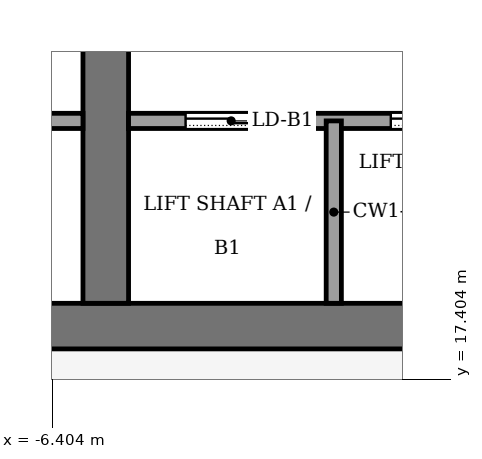
"""IFC4 building model, lengths in metres.
Left out: names, types, materials, properties, quantities, classifications, styles, units other than length and angle.
Written with IfcOpenShell. Run it as: python <this file> out.ifc"""

import sys

from ifc_helpers import new_model, si_unit, direction, frame, frame_2d, origin, place, context, subcontext, project, spatial, rectangle, extrude, element, fill, save


model = new_model("IFC4")
c1 = context("Model", 3, precision=1e-05, world=origin(), true_north=direction((0.0, 1.0)))
c2 = subcontext(c1, "Body", "Model", "MODEL_VIEW")
j1 = project(units=[si_unit("LENGTHUNIT", "METRE"), si_unit("PLANEANGLEUNIT", "RADIAN")], contexts=[c1])
p1 = place(None, origin())
s1 = spatial("IfcSite", under=j1, at=p1, CompositionType="ELEMENT")
p2 = place(p1, origin())
s2 = spatial("IfcBuilding", under=s1, at=p2, CompositionType="ELEMENT")
p3 = place(p2, frame((0.0, 0.0, 322.0)))
s3 = spatial("IfcBuildingStorey", under=s2, at=p3, CompositionType="ELEMENT", Elevation=322.0)
p4 = place(p3, frame((-13.2, 18.1, -0.13), z_axis=(0.0, 0.0, 1.0), x_axis=(1.0, 0.0, 0.0)))
e1 = element("IfcWall", 1, at=p4, inside=s3, PredefinedType="SHEAR", context=c2, shape_type="SweptSolid", body=[
    extrude(rectangle(XDim=26.4, YDim=0.6, at=frame_2d((13.2, 0.0))), origin(), (0.0, 0.0, 1.0), 4.0),
])
p5 = place(p3, frame((-5.7, 18.4, -0.13), z_axis=(0.0, 0.0, 1.0), x_axis=(0.0, 1.0, 0.0)))
e2 = element("IfcWall", 2, at=p5, inside=s3, PredefinedType="SHEAR", context=c2, shape_type="SweptSolid", body=[
    extrude(rectangle(XDim=19.2, YDim=0.6, at=frame_2d((9.6, 0.0))), origin(), (0.0, 0.0, 1.0), 4.0),
])
p6 = place(p5, frame((8.35, 0.0, 0.13)))
e3 = element("IfcOpeningElement", 3, at=p6, cuts=e2, PredefinedType="OPENING", context=c2, shape_type="SweptSolid", body=[
    extrude(rectangle(XDim=0.9, YDim=2.1, at=frame_2d((0.45, 1.05))), frame((0.0, 0.31, 0.0), z_axis=(0.0, -1.0, 0.0), x_axis=(1.0, 0.0, 0.0)), (0.0, 0.0, 1.0), 0.62),
])
p7 = place(p3, frame((-12.6, 20.8, 0.0), z_axis=(0.0, 0.0, 1.0), x_axis=(1.0, 0.0, 0.0)))
e4 = element("IfcWall", 4, at=p7, inside=s3, PredefinedType="PARTITIONING", context=c2, shape_type="SweptSolid", body=[
    extrude(rectangle(XDim=6.6, YDim=0.2, at=frame_2d((3.3, 0.0))), origin(), (0.0, 0.0, 1.0), 3.87),
])
p8 = place(p7, frame((2.8, 0.0, 0.0)))
e5 = element("IfcOpeningElement", 5, at=p8, cuts=e4, PredefinedType="OPENING", context=c2, shape_type="SweptSolid", body=[
    extrude(rectangle(XDim=1.0, YDim=2.1, at=frame_2d((0.5, 1.05))), frame((0.0, 0.11, 0.0), z_axis=(0.0, -1.0, 0.0), x_axis=(1.0, 0.0, 0.0)), (0.0, 0.0, 1.0), 0.22),
])
p9 = place(p3, frame((-5.4, 20.8, 0.0), z_axis=(0.0, 0.0, 1.0), x_axis=(1.0, 0.0, 0.0)))
e6 = element("IfcWall", 6, at=p9, inside=s3, PredefinedType="PARTITIONING", context=c2, shape_type="SweptSolid", body=[
    extrude(rectangle(XDim=10.8, YDim=0.2, at=frame_2d((5.4, 0.0))), origin(), (0.0, 0.0, 1.0), 3.87),
])
p10 = place(p9, frame((0.75, 0.0, 0.0)))
e7 = element("IfcOpeningElement", 7, at=p10, cuts=e6, PredefinedType="OPENING", context=c2, shape_type="SweptSolid", body=[
    extrude(rectangle(XDim=1.2, YDim=2.2, at=frame_2d((0.6, 1.1))), frame((0.0, 0.11, 0.0), z_axis=(0.0, -1.0, 0.0), x_axis=(1.0, 0.0, 0.0)), (0.0, 0.0, 1.0), 0.22),
])
p11 = place(p9, frame((3.45, 0.0, 0.0)))
e8 = element("IfcOpeningElement", 8, at=p11, cuts=e6, PredefinedType="OPENING", context=c2, shape_type="SweptSolid", body=[
    extrude(rectangle(XDim=1.2, YDim=2.2, at=frame_2d((0.6, 1.1))), frame((0.0, 0.11, 0.0), z_axis=(0.0, -1.0, 0.0), x_axis=(1.0, 0.0, 0.0)), (0.0, 0.0, 1.0), 0.22),
])
p12 = place(p9, frame((6.15, 0.0, 0.0)))
e9 = element("IfcOpeningElement", 9, at=p12, cuts=e6, PredefinedType="OPENING", context=c2, shape_type="SweptSolid", body=[
    extrude(rectangle(XDim=1.2, YDim=2.2, at=frame_2d((0.6, 1.1))), frame((0.0, 0.11, 0.0), z_axis=(0.0, -1.0, 0.0), x_axis=(1.0, 0.0, 0.0)), (0.0, 0.0, 1.0), 0.22),
])
p13 = place(p9, frame((8.85, 0.0, 0.0)))
e10 = element("IfcOpeningElement", 10, at=p13, cuts=e6, PredefinedType="OPENING", context=c2, shape_type="SweptSolid", body=[
    extrude(rectangle(XDim=1.2, YDim=2.2, at=frame_2d((0.6, 1.1))), frame((0.0, 0.11, 0.0), z_axis=(0.0, -1.0, 0.0), x_axis=(1.0, 0.0, 0.0)), (0.0, 0.0, 1.0), 0.22),
])
p14 = place(p3, frame((-2.7, 18.4, 0.0), z_axis=(0.0, 0.0, 1.0), x_axis=(0.0, 1.0, 0.0)))
e11 = element("IfcWall", 11, at=p14, inside=s3, PredefinedType="PARTITIONING", context=c2, shape_type="SweptSolid", body=[
    extrude(rectangle(XDim=2.4, YDim=0.2, at=frame_2d((1.2, 0.0))), origin(), (0.0, 0.0, 1.0), 3.87),
])
p15 = place(p10, origin())
e12 = element("IfcDoor", 12, at=p15, inside=s3, OperationType="SLIDING_TO_LEFT", PredefinedType="DOOR", context=c2, shape_type="SweptSolid", body=[
    extrude(rectangle(XDim=1.2, YDim=2.2, at=frame_2d((0.6, 1.1))), frame((0.0, 0.025, 0.0), z_axis=(0.0, -1.0, 0.0), x_axis=(1.0, 0.0, 0.0)), (0.0, 0.0, 1.0), 0.05),
])
fill(e7, e12)
p16 = place(p11, origin())
e13 = element("IfcDoor", 13, at=p16, inside=s3, OperationType="SLIDING_TO_LEFT", PredefinedType="DOOR", context=c2, shape_type="SweptSolid", body=[
    extrude(rectangle(XDim=1.2, YDim=2.2, at=frame_2d((0.6, 1.1))), frame((0.0, 0.025, 0.0), z_axis=(0.0, -1.0, 0.0), x_axis=(1.0, 0.0, 0.0)), (0.0, 0.0, 1.0), 0.05),
])
fill(e8, e13)
save(model, sys.argv[1])
